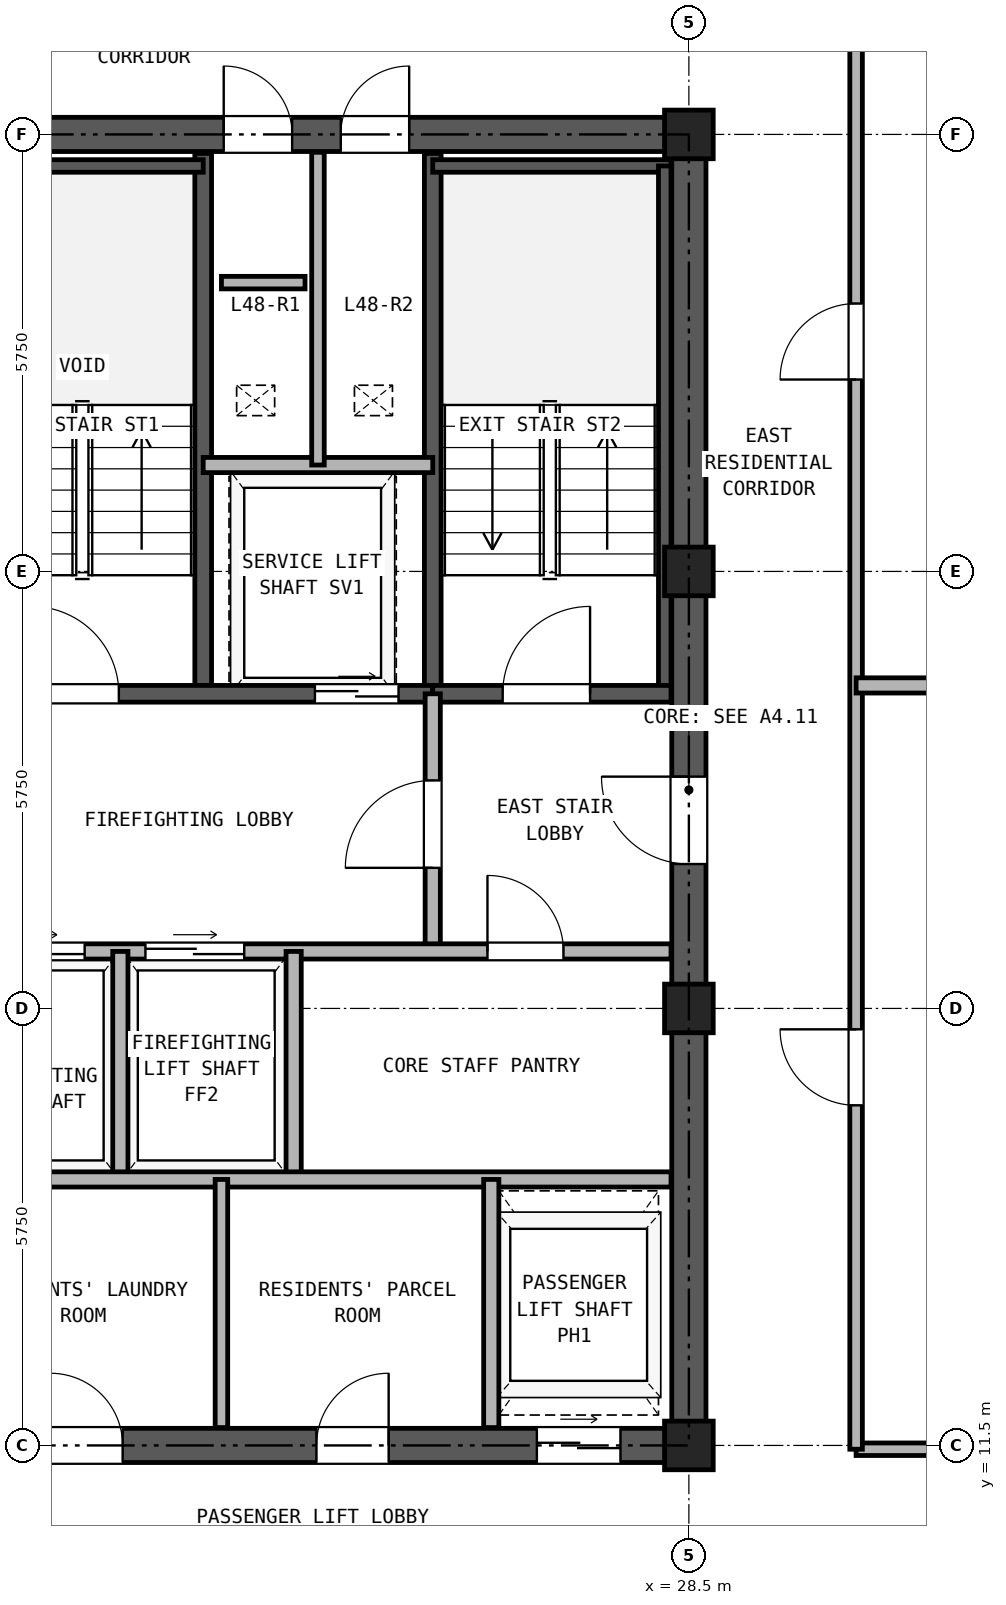
"""IFC4 building model, lengths in metres.
Left out: names, types, materials, properties, quantities, classifications, styles, units other than length and angle.
Written with IfcOpenShell. Run it as: python <this file> out.ifc"""

import sys

from ifc_helpers import new_model, si_unit, direction, frame, frame_2d, origin, origin_2d, place, context, subcontext, project, spatial, rectangle, hollow_rectangle, extrude, source, transform, mapped, element, fill, save


model = new_model("IFC4")
c1 = context("Model", 3, precision=1e-05, world=origin(), true_north=direction((0.0, 1.0)))
c2 = subcontext(c1, "Body", "Model", "MODEL_VIEW")
j1 = project(units=[si_unit("LENGTHUNIT", "METRE"), si_unit("PLANEANGLEUNIT", "RADIAN")], contexts=[c1])
p1 = place(None, origin())
s1 = spatial("IfcSite", under=j1, at=p1, CompositionType="ELEMENT")
p2 = place(p1, origin())
s2 = spatial("IfcBuilding", under=s1, at=p2, CompositionType="ELEMENT")
p3 = place(p2, frame((0.0, 0.0, 172.1)))
s3 = spatial("IfcBuildingStorey", under=s2, at=p3, CompositionType="ELEMENT", Elevation=172.1)
m1 = source(origin(), c2, "Body", "SweptSolid", [
    extrude(hollow_rectangle(XDim=0.64, YDim=0.64, WallThickness=0.035, at=origin_2d()), origin(), (0.0, 0.0, 1.0), 2.95),
])
for number, where, z_axis, x_axis in (
    (1, (28.5, 11.5, 0.0), (0.0, 0.0, 1.0), (1.0, 0.0, 0.0)),
    (2, (28.5, 17.25, 0.0), (0.0, 0.0, 1.0), (1.0, 0.0, 0.0)),
    (3, (28.5, 23.0, 0.0), (0.0, 0.0, 1.0), (1.0, 0.0, 0.0)),
    (4, (28.5, 28.75, 0.0), (0.0, 0.0, 1.0), (1.0, 0.0, 0.0)),
):
    element("IfcColumn", number, at=place(p3, frame(where, z_axis=z_axis, x_axis=x_axis)), inside=s3, PredefinedType="COLUMN", context=c2, shape_type="MappedRepresentation", body=[
        mapped(m1, transform((0.0, 0.0, 0.0), x_axis=(1.0, 0.0, 0.0), y_axis=(0.0, 1.0, 0.0), z_axis=(0.0, 0.0, 1.0), scale=1.0)),
    ])
p4 = place(p3, frame((18.275, 11.5, 0.0), z_axis=(0.0, 0.0, 1.0), x_axis=(1.0, 0.0, 0.0)))
e5 = element("IfcWall", 5, at=p4, inside=s3, PredefinedType="SHEAR", context=c2, shape_type="SweptSolid", body=[
    extrude(rectangle(XDim=10.45, YDim=0.45, at=frame_2d((5.225, 0.0))), origin(), (0.0, 0.0, 1.0), 2.95),
])
p5 = place(p4, frame((1.825, 0.0, 0.0)))
e6 = element("IfcOpeningElement", 6, at=p5, cuts=e5, PredefinedType="OPENING", context=c2, shape_type="SweptSolid", body=[
    extrude(rectangle(XDim=0.95, YDim=2.15, at=frame_2d((0.475, 1.075))), frame((0.0, 0.235, 0.0), z_axis=(0.0, -1.0, 0.0), x_axis=(1.0, 0.0, 0.0)), (0.0, 0.0, 1.0), 0.47),
])
p6 = place(p4, frame((5.325, 0.0, 0.0)))
e7 = element("IfcOpeningElement", 7, at=p6, cuts=e5, PredefinedType="OPENING", context=c2, shape_type="SweptSolid", body=[
    extrude(rectangle(XDim=0.95, YDim=2.15, at=frame_2d((0.475, 1.075))), frame((0.0, 0.235, 0.0), z_axis=(0.0, -1.0, 0.0), x_axis=(1.0, 0.0, 0.0)), (0.0, 0.0, 1.0), 0.47),
])
p7 = place(p4, frame((8.225, 0.0, 0.0)))
e8 = element("IfcOpeningElement", 8, at=p7, cuts=e5, PredefinedType="OPENING", context=c2, shape_type="SweptSolid", body=[
    extrude(rectangle(XDim=1.1, YDim=2.25, at=frame_2d((0.55, 1.125))), frame((0.0, 0.235, 0.0), z_axis=(0.0, -1.0, 0.0), x_axis=(1.0, 0.0, 0.0)), (0.0, 0.0, 1.0), 0.47),
])
p8 = place(p3, frame((18.275, 28.75, 0.0), z_axis=(0.0, 0.0, 1.0), x_axis=(1.0, 0.0, 0.0)))
e9 = element("IfcWall", 9, at=p8, inside=s3, PredefinedType="SHEAR", context=c2, shape_type="SweptSolid", body=[
    extrude(rectangle(XDim=10.45, YDim=0.45, at=frame_2d((5.225, 0.0))), origin(), (0.0, 0.0, 1.0), 2.95),
])
p9 = place(p8, frame((4.105, 0.0, 0.0)))
e10 = element("IfcOpeningElement", 10, at=p9, cuts=e9, PredefinedType="OPENING", context=c2, shape_type="SweptSolid", body=[
    extrude(rectangle(XDim=0.9, YDim=2.05, at=frame_2d((0.45, 1.025))), frame((0.0, 0.235, 0.0), z_axis=(0.0, -1.0, 0.0), x_axis=(1.0, 0.0, 0.0)), (0.0, 0.0, 1.0), 0.47),
])
p10 = place(p8, frame((5.645, 0.0, 0.0)))
e11 = element("IfcOpeningElement", 11, at=p10, cuts=e9, PredefinedType="OPENING", context=c2, shape_type="SweptSolid", body=[
    extrude(rectangle(XDim=0.9, YDim=2.05, at=frame_2d((0.45, 1.025))), frame((0.0, 0.235, 0.0), z_axis=(0.0, -1.0, 0.0), x_axis=(1.0, 0.0, 0.0)), (0.0, 0.0, 1.0), 0.47),
])
p11 = place(p3, frame((28.5, 11.725, 0.0), z_axis=(0.0, 0.0, 1.0), x_axis=(0.0, 1.0, 0.0)))
e12 = element("IfcWall", 12, at=p11, inside=s3, PredefinedType="SHEAR", context=c2, shape_type="SweptSolid", body=[
    extrude(rectangle(XDim=16.8, YDim=0.45, at=frame_2d((8.4, 0.0))), origin(), (0.0, 0.0, 1.0), 2.95),
])
p12 = place(p11, frame((7.425, 0.0, 0.0)))
e13 = element("IfcOpeningElement", 13, at=p12, cuts=e12, PredefinedType="OPENING", context=c2, shape_type="SweptSolid", body=[
    extrude(rectangle(XDim=1.15, YDim=2.2, at=frame_2d((0.575, 1.1))), frame((0.0, 0.235, 0.0), z_axis=(0.0, -1.0, 0.0), x_axis=(1.0, 0.0, 0.0)), (0.0, 0.0, 1.0), 0.47),
])
for number, where, z_axis, x_axis in (
    (14, (22.11, 21.39, 0.0), (0.0, 0.0, 1.0), (0.0, 1.0, 0.0)),
    (15, (25.13, 21.39, 0.0), (0.0, 0.0, 1.0), (0.0, 1.0, 0.0)),
):
    element("IfcWall", number, at=place(p3, frame(where, z_axis=z_axis, x_axis=x_axis)), inside=s3, PredefinedType="SOLIDWALL", context=c2, shape_type="SweptSolid", body=[
        extrude(rectangle(XDim=7.11, YDim=0.22, at=frame_2d((3.555, 0.0))), origin(), (0.0, 0.0, 1.0), 2.95),
    ])
p13 = place(p3, frame((18.735, 28.335, 0.0), z_axis=(0.0, 0.0, 1.0), x_axis=(1.0, 0.0, 0.0)))
e16 = element("IfcWall", 16, at=p13, inside=s3, PredefinedType="PARTITIONING", context=c2, shape_type="SweptSolid", body=[
    extrude(rectangle(XDim=3.375, YDim=0.165, at=frame_2d((1.688, 0.0))), origin(), (0.0, 0.0, 1.0), 2.95),
])
p14 = place(p3, frame((25.13, 28.335, 0.0), z_axis=(0.0, 0.0, 1.0), x_axis=(1.0, 0.0, 0.0)))
e17 = element("IfcWall", 17, at=p14, inside=s3, PredefinedType="PARTITIONING", context=c2, shape_type="SweptSolid", body=[
    extrude(rectangle(XDim=3.135, YDim=0.165, at=frame_2d((1.567, 0.0))), origin(), (0.0, 0.0, 1.0), 2.95),
])
p15 = place(p3, frame((28.183, 21.39, 0.0), z_axis=(0.0, 0.0, 1.0), x_axis=(0.0, 1.0, 0.0)))
e18 = element("IfcWall", 18, at=p15, inside=s3, PredefinedType="PARTITIONING", context=c2, shape_type="SweptSolid", body=[
    extrude(rectangle(XDim=6.945, YDim=0.165, at=frame_2d((3.473, 0.0))), origin(), (0.0, 0.0, 1.0), 2.95),
])
p16 = place(p3, frame((18.735, 21.39, 0.0), z_axis=(0.0, 0.0, 1.0), x_axis=(1.0, 0.0, 0.0)))
e19 = element("IfcWall", 19, at=p16, inside=s3, PredefinedType="SOLIDWALL", context=c2, shape_type="SweptSolid", body=[
    extrude(rectangle(XDim=6.395, YDim=0.22, at=frame_2d((3.197, 0.0))), origin(), (0.0, 0.0, 1.0), 2.95),
])
p17 = place(p16, frame((1.115, 0.0, 0.0)))
e20 = element("IfcOpeningElement", 20, at=p17, cuts=e19, PredefinedType="OPENING", context=c2, shape_type="SweptSolid", body=[
    extrude(rectangle(XDim=1.15, YDim=2.2, at=frame_2d((0.575, 1.1))), frame((0.0, 0.12, 0.0), z_axis=(0.0, -1.0, 0.0), x_axis=(1.0, 0.0, 0.0)), (0.0, 0.0, 1.0), 0.24),
])
p18 = place(p16, frame((4.845, 0.0, 0.0)))
e21 = element("IfcOpeningElement", 21, at=p18, cuts=e19, PredefinedType="OPENING", context=c2, shape_type="SweptSolid", body=[
    extrude(rectangle(XDim=1.1, YDim=2.25, at=frame_2d((0.55, 1.125))), frame((0.0, 0.12, 0.0), z_axis=(0.0, -1.0, 0.0), x_axis=(1.0, 0.0, 0.0)), (0.0, 0.0, 1.0), 0.24),
])
p19 = place(p3, frame((25.13, 21.39, 0.0), z_axis=(0.0, 0.0, 1.0), x_axis=(1.0, 0.0, 0.0)))
e22 = element("IfcWall", 22, at=p19, inside=s3, PredefinedType="SOLIDWALL", context=c2, shape_type="SweptSolid", body=[
    extrude(rectangle(XDim=3.135, YDim=0.22, at=frame_2d((1.567, 0.0))), origin(), (0.0, 0.0, 1.0), 2.95),
])
p20 = place(p19, frame((0.92, 0.0, 0.0)))
e23 = element("IfcOpeningElement", 23, at=p20, cuts=e22, PredefinedType="OPENING", context=c2, shape_type="SweptSolid", body=[
    extrude(rectangle(XDim=1.15, YDim=2.2, at=frame_2d((0.575, 1.1))), frame((0.0, 0.12, 0.0), z_axis=(0.0, -1.0, 0.0), x_axis=(1.0, 0.0, 0.0)), (0.0, 0.0, 1.0), 0.24),
])
p21 = place(p3, frame((22.11, 24.4, 0.0), z_axis=(0.0, 0.0, 1.0), x_axis=(1.0, 0.0, 0.0)))
e24 = element("IfcWall", 24, at=p21, inside=s3, PredefinedType="PARTITIONING", context=c2, shape_type="SweptSolid", body=[
    extrude(rectangle(XDim=3.02, YDim=0.2, at=frame_2d((1.51, 0.0))), origin(), (0.0, 0.0, 1.0), 2.95),
])
p22 = place(p3, frame((23.62, 24.4, 0.0), z_axis=(0.0, 0.0, 1.0), x_axis=(0.0, 1.0, 0.0)))
e25 = element("IfcWall", 25, at=p22, inside=s3, PredefinedType="PARTITIONING", context=c2, shape_type="SweptSolid", body=[
    extrude(rectangle(XDim=4.115, YDim=0.165, at=frame_2d((2.058, 0.0))), origin(), (0.0, 0.0, 1.0), 2.95),
])
p23 = place(p3, frame((25.13, 18.0, 0.0), z_axis=(0.0, 0.0, 1.0), x_axis=(0.0, 1.0, 0.0)))
e26 = element("IfcWall", 26, at=p23, inside=s3, PredefinedType="PARTITIONING", context=c2, shape_type="SweptSolid", body=[
    extrude(rectangle(XDim=3.39, YDim=0.2, at=frame_2d((1.695, 0.0))), origin(), (0.0, 0.0, 1.0), 2.95),
])
p24 = place(p23, frame((1.1, 0.0, 0.0)))
e27 = element("IfcOpeningElement", 27, at=p24, cuts=e26, PredefinedType="OPENING", context=c2, shape_type="SweptSolid", body=[
    extrude(rectangle(XDim=1.15, YDim=2.2, at=frame_2d((0.575, 1.1))), frame((0.0, 0.11, 0.0), z_axis=(0.0, -1.0, 0.0), x_axis=(1.0, 0.0, 0.0)), (0.0, 0.0, 1.0), 0.22),
])
p25 = place(p3, frame((18.735, 18.0, 0.0), z_axis=(0.0, 0.0, 1.0), x_axis=(1.0, 0.0, 0.0)))
e28 = element("IfcWall", 28, at=p25, inside=s3, PredefinedType="PARTITIONING", context=c2, shape_type="SweptSolid", body=[
    extrude(rectangle(XDim=9.53, YDim=0.2, at=frame_2d((4.765, 0.0))), origin(), (0.0, 0.0, 1.0), 2.95),
])
p26 = place(p25, frame((0.515, 0.0, 0.0)))
e29 = element("IfcOpeningElement", 29, at=p26, cuts=e28, PredefinedType="OPENING", context=c2, shape_type="SweptSolid", body=[
    extrude(rectangle(XDim=1.3, YDim=2.3, at=frame_2d((0.65, 1.15))), frame((0.0, 0.11, 0.0), z_axis=(0.0, -1.0, 0.0), x_axis=(1.0, 0.0, 0.0)), (0.0, 0.0, 1.0), 0.22),
])
p27 = place(p25, frame((2.615, 0.0, 0.0)))
e30 = element("IfcOpeningElement", 30, at=p27, cuts=e28, PredefinedType="OPENING", context=c2, shape_type="SweptSolid", body=[
    extrude(rectangle(XDim=1.3, YDim=2.3, at=frame_2d((0.65, 1.15))), frame((0.0, 0.11, 0.0), z_axis=(0.0, -1.0, 0.0), x_axis=(1.0, 0.0, 0.0)), (0.0, 0.0, 1.0), 0.22),
])
p28 = place(p25, frame((7.115, 0.0, 0.0)))
e31 = element("IfcOpeningElement", 31, at=p28, cuts=e28, PredefinedType="OPENING", context=c2, shape_type="SweptSolid", body=[
    extrude(rectangle(XDim=1.0, YDim=2.15, at=frame_2d((0.5, 1.075))), frame((0.0, 0.11, 0.0), z_axis=(0.0, -1.0, 0.0), x_axis=(1.0, 0.0, 0.0)), (0.0, 0.0, 1.0), 0.22),
])
for number, where, z_axis, x_axis in (
    (32, (21.02, 15.0, 0.0), (0.0, 0.0, 1.0), (0.0, 1.0, 0.0)),
    (33, (23.3, 15.0, 0.0), (0.0, 0.0, 1.0), (0.0, 1.0, 0.0)),
):
    element("IfcWall", number, at=place(p3, frame(where, z_axis=z_axis, x_axis=x_axis)), inside=s3, PredefinedType="PARTITIONING", context=c2, shape_type="SweptSolid", body=[
        extrude(rectangle(XDim=3.0, YDim=0.2, at=frame_2d((1.5, 0.0))), origin(), (0.0, 0.0, 1.0), 2.95),
    ])
p29 = place(p3, frame((18.735, 15.0, 0.0), z_axis=(0.0, 0.0, 1.0), x_axis=(1.0, 0.0, 0.0)))
e34 = element("IfcWall", 34, at=p29, inside=s3, PredefinedType="PARTITIONING", context=c2, shape_type="SweptSolid", body=[
    extrude(rectangle(XDim=9.53, YDim=0.2, at=frame_2d((4.765, 0.0))), origin(), (0.0, 0.0, 1.0), 2.95),
])
p30 = place(p3, frame((22.35, 11.735, 0.0), z_axis=(0.0, 0.0, 1.0), x_axis=(0.0, 1.0, 0.0)))
e35 = element("IfcWall", 35, at=p30, inside=s3, PredefinedType="PARTITIONING", context=c2, shape_type="SweptSolid", body=[
    extrude(rectangle(XDim=3.265, YDim=0.165, at=frame_2d((1.632, 0.0))), origin(), (0.0, 0.0, 1.0), 2.95),
])
p31 = place(p3, frame((25.9, 11.735, 0.0), z_axis=(0.0, 0.0, 1.0), x_axis=(0.0, 1.0, 0.0)))
e36 = element("IfcWall", 36, at=p31, inside=s3, PredefinedType="PARTITIONING", context=c2, shape_type="SweptSolid", body=[
    extrude(rectangle(XDim=3.265, YDim=0.2, at=frame_2d((1.632, 0.0))), origin(), (0.0, 0.0, 1.0), 2.95),
])
p32 = place(p3, frame((30.7, 11.45, 0.0), z_axis=(0.0, 0.0, 1.0), x_axis=(1.0, 0.0, 0.0)))
e37 = element("IfcWall", 37, at=p32, inside=s3, PredefinedType="PARTITIONING", context=c2, shape_type="SweptSolid", body=[
    extrude(rectangle(XDim=7.5, YDim=0.165, at=frame_2d((3.75, 0.0))), origin(), (0.0, 0.0, 1.0), 2.323),
])
p33 = place(p3, frame((30.7, 11.45, 0.0), z_axis=(0.0, 0.0, 1.0), x_axis=(0.0, 1.0, 0.0)))
e38 = element("IfcWall", 38, at=p33, inside=s3, PredefinedType="PARTITIONING", context=c2, shape_type="SweptSolid", body=[
    extrude(rectangle(XDim=23.69, YDim=0.165, at=frame_2d((11.845, 0.0))), origin(), (0.0, 0.0, 1.0), 2.95),
])
p34 = place(p33, frame((4.525, 0.0, 0.0)))
e39 = element("IfcOpeningElement", 39, at=p34, cuts=e38, PredefinedType="OPENING", context=c2, shape_type="SweptSolid", body=[
    extrude(rectangle(XDim=1.0, YDim=2.15, at=frame_2d((0.5, 1.075))), frame((0.0, 0.093, 0.0), z_axis=(0.0, -1.0, 0.0), x_axis=(1.0, 0.0, 0.0)), (0.0, 0.0, 1.0), 0.185),
])
p35 = place(p33, frame((14.075, 0.0, 0.0)))
e40 = element("IfcOpeningElement", 40, at=p35, cuts=e38, PredefinedType="OPENING", context=c2, shape_type="SweptSolid", body=[
    extrude(rectangle(XDim=1.0, YDim=2.15, at=frame_2d((0.5, 1.075))), frame((0.0, 0.093, 0.0), z_axis=(0.0, -1.0, 0.0), x_axis=(1.0, 0.0, 0.0)), (0.0, 0.0, 1.0), 0.185),
])
p36 = place(p3, frame((30.7, 21.5, 0.0), z_axis=(0.0, 0.0, 1.0), x_axis=(1.0, 0.0, 0.0)))
e41 = element("IfcWall", 41, at=p36, inside=s3, PredefinedType="PARTITIONING", context=c2, shape_type="SweptSolid", body=[
    extrude(rectangle(XDim=10.94, YDim=0.2, at=frame_2d((5.47, 0.0))), origin(), (0.0, 0.0, 1.0), 2.95),
])
p37 = place(p3, frame((22.35, 26.8, 0.0), z_axis=(0.0, 0.0, 1.0), x_axis=(1.0, 0.0, 0.0)))
e42 = element("IfcWall", 42, at=p37, inside=s3, PredefinedType="PARTITIONING", context=c2, shape_type="SweptSolid", body=[
    extrude(rectangle(XDim=1.1, YDim=0.165, at=frame_2d((0.55, 0.0))), origin(), (0.0, 0.0, 1.0), 2.95),
])
p38 = place(p17, frame((1.15, 0.0, 0.0), z_axis=(0.0, 0.0, 1.0), x_axis=(-1.0, 0.0, 0.0)))
e43 = element("IfcDoor", 43, at=p38, inside=s3, OperationType="SINGLE_SWING_LEFT", PredefinedType="DOOR", context=c2, shape_type="SweptSolid", body=[
    extrude(rectangle(XDim=1.15, YDim=2.2, at=frame_2d((0.575, 1.1))), frame((0.0, 0.025, 0.0), z_axis=(0.0, -1.0, 0.0), x_axis=(1.0, 0.0, 0.0)), (0.0, 0.0, 1.0), 0.05),
])
fill(e20, e43)
p39 = place(p20, frame((1.15, 0.0, 0.0), z_axis=(0.0, 0.0, 1.0), x_axis=(-1.0, 0.0, 0.0)))
e44 = element("IfcDoor", 44, at=p39, inside=s3, OperationType="SINGLE_SWING_RIGHT", PredefinedType="DOOR", context=c2, shape_type="SweptSolid", body=[
    extrude(rectangle(XDim=1.15, YDim=2.2, at=frame_2d((0.575, 1.1))), frame((0.0, 0.025, 0.0), z_axis=(0.0, -1.0, 0.0), x_axis=(1.0, 0.0, 0.0)), (0.0, 0.0, 1.0), 0.05),
])
fill(e23, e44)
p40 = place(p18, frame((1.1, 0.0, 0.0), z_axis=(0.0, 0.0, 1.0), x_axis=(-1.0, 0.0, 0.0)))
e45 = element("IfcDoor", 45, at=p40, inside=s3, OperationType="DOUBLE_DOOR_SLIDING", PredefinedType="DOOR", context=c2, shape_type="SweptSolid", body=[
    extrude(rectangle(XDim=1.1, YDim=2.25, at=frame_2d((0.55, 1.125))), frame((0.0, 0.025, 0.0), z_axis=(0.0, -1.0, 0.0), x_axis=(1.0, 0.0, 0.0)), (0.0, 0.0, 1.0), 0.05),
])
fill(e21, e45)
p41 = place(p24, origin())
e46 = element("IfcDoor", 46, at=p41, inside=s3, OperationType="SINGLE_SWING_LEFT", PredefinedType="DOOR", context=c2, shape_type="SweptSolid", body=[
    extrude(rectangle(XDim=1.15, YDim=2.2, at=frame_2d((0.575, 1.1))), frame((0.0, 0.025, 0.0), z_axis=(0.0, -1.0, 0.0), x_axis=(1.0, 0.0, 0.0)), (0.0, 0.0, 1.0), 0.05),
])
fill(e27, e46)
p42 = place(p26, origin())
e47 = element("IfcDoor", 47, at=p42, inside=s3, OperationType="DOUBLE_DOOR_SLIDING", PredefinedType="DOOR", context=c2, shape_type="SweptSolid", body=[
    extrude(rectangle(XDim=1.3, YDim=2.3, at=frame_2d((0.65, 1.15))), frame((0.0, 0.025, 0.0), z_axis=(0.0, -1.0, 0.0), x_axis=(1.0, 0.0, 0.0)), (0.0, 0.0, 1.0), 0.05),
])
fill(e29, e47)
p43 = place(p27, origin())
e48 = element("IfcDoor", 48, at=p43, inside=s3, OperationType="DOUBLE_DOOR_SLIDING", PredefinedType="DOOR", context=c2, shape_type="SweptSolid", body=[
    extrude(rectangle(XDim=1.3, YDim=2.3, at=frame_2d((0.65, 1.15))), frame((0.0, 0.025, 0.0), z_axis=(0.0, -1.0, 0.0), x_axis=(1.0, 0.0, 0.0)), (0.0, 0.0, 1.0), 0.05),
])
fill(e30, e48)
p44 = place(p28, frame((1.0, 0.0, 0.0), z_axis=(0.0, 0.0, 1.0), x_axis=(-1.0, 0.0, 0.0)))
e49 = element("IfcDoor", 49, at=p44, inside=s3, OperationType="SINGLE_SWING_LEFT", PredefinedType="DOOR", context=c2, shape_type="SweptSolid", body=[
    extrude(rectangle(XDim=1.0, YDim=2.15, at=frame_2d((0.5, 1.075))), frame((0.0, 0.025, 0.0), z_axis=(0.0, -1.0, 0.0), x_axis=(1.0, 0.0, 0.0)), (0.0, 0.0, 1.0), 0.05),
])
fill(e31, e49)
p45 = place(p12, origin())
e50 = element("IfcDoor", 50, at=p45, inside=s3, OperationType="SINGLE_SWING_RIGHT", PredefinedType="DOOR", context=c2, shape_type="SweptSolid", body=[
    extrude(rectangle(XDim=1.15, YDim=2.2, at=frame_2d((0.575, 1.1))), frame((0.0, 0.025, 0.0), z_axis=(0.0, -1.0, 0.0), x_axis=(1.0, 0.0, 0.0)), (0.0, 0.0, 1.0), 0.05),
])
fill(e13, e50)
p46 = place(p9, origin())
e51 = element("IfcDoor", 51, at=p46, inside=s3, OperationType="SINGLE_SWING_LEFT", PredefinedType="DOOR", context=c2, shape_type="SweptSolid", body=[
    extrude(rectangle(XDim=0.9, YDim=2.05, at=frame_2d((0.45, 1.025))), frame((0.0, 0.025, 0.0), z_axis=(0.0, -1.0, 0.0), x_axis=(1.0, 0.0, 0.0)), (0.0, 0.0, 1.0), 0.05),
])
fill(e10, e51)
p47 = place(p10, origin())
e52 = element("IfcDoor", 52, at=p47, inside=s3, OperationType="SINGLE_SWING_RIGHT", PredefinedType="DOOR", context=c2, shape_type="SweptSolid", body=[
    extrude(rectangle(XDim=0.9, YDim=2.05, at=frame_2d((0.45, 1.025))), frame((0.0, 0.025, 0.0), z_axis=(0.0, -1.0, 0.0), x_axis=(1.0, 0.0, 0.0)), (0.0, 0.0, 1.0), 0.05),
])
fill(e11, e52)
p48 = place(p5, frame((0.95, 0.0, 0.0), z_axis=(0.0, 0.0, 1.0), x_axis=(-1.0, 0.0, 0.0)))
e53 = element("IfcDoor", 53, at=p48, inside=s3, OperationType="SINGLE_SWING_LEFT", PredefinedType="DOOR", context=c2, shape_type="SweptSolid", body=[
    extrude(rectangle(XDim=0.95, YDim=2.15, at=frame_2d((0.475, 1.075))), frame((0.0, 0.025, 0.0), z_axis=(0.0, -1.0, 0.0), x_axis=(1.0, 0.0, 0.0)), (0.0, 0.0, 1.0), 0.05),
])
fill(e6, e53)
p49 = place(p6, frame((0.95, 0.0, 0.0), z_axis=(0.0, 0.0, 1.0), x_axis=(-1.0, 0.0, 0.0)))
e54 = element("IfcDoor", 54, at=p49, inside=s3, OperationType="SINGLE_SWING_RIGHT", PredefinedType="DOOR", context=c2, shape_type="SweptSolid", body=[
    extrude(rectangle(XDim=0.95, YDim=2.15, at=frame_2d((0.475, 1.075))), frame((0.0, 0.025, 0.0), z_axis=(0.0, -1.0, 0.0), x_axis=(1.0, 0.0, 0.0)), (0.0, 0.0, 1.0), 0.05),
])
fill(e7, e54)
p50 = place(p7, frame((1.1, 0.0, 0.0), z_axis=(0.0, 0.0, 1.0), x_axis=(-1.0, 0.0, 0.0)))
e55 = element("IfcDoor", 55, at=p50, inside=s3, OperationType="DOUBLE_DOOR_SLIDING", PredefinedType="DOOR", context=c2, shape_type="SweptSolid", body=[
    extrude(rectangle(XDim=1.1, YDim=2.25, at=frame_2d((0.55, 1.125))), frame((0.0, 0.025, 0.0), z_axis=(0.0, -1.0, 0.0), x_axis=(1.0, 0.0, 0.0)), (0.0, 0.0, 1.0), 0.05),
])
fill(e8, e55)
p51 = place(p34, frame((1.0, 0.0, 0.0), z_axis=(0.0, 0.0, 1.0), x_axis=(-1.0, 0.0, 0.0)))
e56 = element("IfcDoor", 56, at=p51, inside=s3, OperationType="SINGLE_SWING_RIGHT", PredefinedType="DOOR", context=c2, shape_type="SweptSolid", body=[
    extrude(rectangle(XDim=1.0, YDim=2.15, at=frame_2d((0.5, 1.075))), frame((0.0, 0.025, 0.0), z_axis=(0.0, -1.0, 0.0), x_axis=(1.0, 0.0, 0.0)), (0.0, 0.0, 1.0), 0.05),
])
fill(e39, e56)
p52 = place(p35, frame((1.0, 0.0, 0.0), z_axis=(0.0, 0.0, 1.0), x_axis=(-1.0, 0.0, 0.0)))
e57 = element("IfcDoor", 57, at=p52, inside=s3, OperationType="SINGLE_SWING_LEFT", PredefinedType="DOOR", context=c2, shape_type="SweptSolid", body=[
    extrude(rectangle(XDim=1.0, YDim=2.15, at=frame_2d((0.5, 1.075))), frame((0.0, 0.025, 0.0), z_axis=(0.0, -1.0, 0.0), x_axis=(1.0, 0.0, 0.0)), (0.0, 0.0, 1.0), 0.05),
])
fill(e40, e57)
save(model, sys.argv[1])
